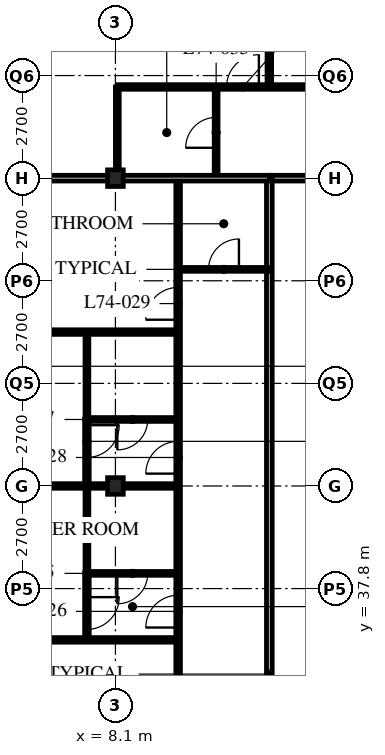
"""IFC4 building model, lengths in metres.
Left out: names, types, materials, properties, quantities, classifications, styles, units other than length and angle.
Written with IfcOpenShell. Run it as: python <this file> out.ifc"""

import sys

from ifc_helpers import new_model, si_unit, direction, frame, frame_2d, origin, origin_2d, place, context, subcontext, project, spatial, rectangle, i_section, extrude, element, fill, save


model = new_model("IFC4")
c1 = context("Model", 3, precision=1e-05, world=origin(), true_north=direction((0.0, 1.0)))
c2 = subcontext(c1, "Body", "Model", "MODEL_VIEW")
j1 = project(units=[si_unit("LENGTHUNIT", "METRE"), si_unit("PLANEANGLEUNIT", "RADIAN")], contexts=[c1])
p1 = place(None, origin())
s1 = spatial("IfcSite", under=j1, at=p1, CompositionType="ELEMENT")
p2 = place(p1, origin())
s2 = spatial("IfcBuilding", under=s1, at=p2, CompositionType="ELEMENT")
p3 = place(p2, frame((0.0, 0.0, 289.2)))
s3 = spatial("IfcBuildingStorey", under=s2, at=p3, CompositionType="ELEMENT", Elevation=289.2)
for number, where, z_axis, x_axis in (
    (1, (8.1, 40.5, 0.0), (0.0, 0.0, 1.0), (1.0, 0.0, 0.0)),
    (2, (8.1, 48.6, 0.0), (0.0, 0.0, 1.0), (1.0, 0.0, 0.0)),
):
    element("IfcColumn", number, at=place(p3, frame(where, z_axis=z_axis, x_axis=x_axis)), inside=s3, PredefinedType="COLUMN", context=c2, shape_type="SweptSolid", body=[
        extrude(i_section(OverallWidth=0.412, OverallDepth=0.437, WebThickness=0.036, FlangeThickness=0.058, FilletRadius=0.015, at=origin_2d()), origin(), (0.0, 0.0, 1.0), 3.9),
    ])
p4 = place(p3, frame((12.15, 48.6, 0.0), z_axis=(0.0, 0.0, 1.0), x_axis=(1.0, 0.0, 0.0)))
e3 = element("IfcWall", 3, at=p4, inside=s3, PredefinedType="PARTITIONING", context=c2, shape_type="SweptSolid", body=[
    extrude(rectangle(XDim=24.3, YDim=0.15, at=frame_2d((12.15, 0.0))), origin(), (0.0, 0.0, 1.0), 3.078),
])
p5 = place(p4, frame((4.95, 0.0, 0.0)))
e4 = element("IfcOpeningElement", 4, at=p5, cuts=e3, PredefinedType="OPENING", context=c2, shape_type="SweptSolid", body=[
    extrude(rectangle(XDim=1.0, YDim=2.1, at=frame_2d((0.5, 1.05))), frame((0.0, 0.085, 0.0), z_axis=(0.0, -1.0, 0.0), x_axis=(1.0, 0.0, 0.0)), (0.0, 0.0, 1.0), 0.17),
])
p6 = place(p4, frame((16.6, 0.0, 0.0)))
e5 = element("IfcOpeningElement", 5, at=p6, cuts=e3, PredefinedType="OPENING", context=c2, shape_type="SweptSolid", body=[
    extrude(rectangle(XDim=1.0, YDim=2.1, at=frame_2d((0.5, 1.05))), frame((0.0, 0.085, 0.0), z_axis=(0.0, -1.0, 0.0), x_axis=(1.0, 0.0, 0.0)), (0.0, 0.0, 1.0), 0.17),
])
p7 = place(p4, frame((1.525, 0.0, 0.0)))
e6 = element("IfcOpeningElement", 6, at=p7, cuts=e3, PredefinedType="OPENING", context=c2, shape_type="SweptSolid", body=[
    extrude(rectangle(XDim=1.0, YDim=2.1, at=frame_2d((0.5, 1.05))), frame((0.0, 0.085, 0.0), z_axis=(0.0, -1.0, 0.0), x_axis=(1.0, 0.0, 0.0)), (0.0, 0.0, 1.0), 0.17),
])
p8 = place(p3, frame((12.15, 22.5, 0.0), z_axis=(0.0, 0.0, 1.0), x_axis=(0.0, 1.0, 0.0)))
e7 = element("IfcWall", 7, at=p8, inside=s3, PredefinedType="PARTITIONING", context=c2, shape_type="SweptSolid", body=[
    extrude(rectangle(XDim=26.1, YDim=0.15, at=frame_2d((13.05, 0.0))), origin(), (0.0, 0.0, 1.0), 3.69),
])
p9 = place(p8, frame((0.4, 0.0, 0.0)))
e8 = element("IfcOpeningElement", 8, at=p9, cuts=e7, PredefinedType="OPENING", context=c2, shape_type="SweptSolid", body=[
    extrude(rectangle(XDim=1.0, YDim=2.1, at=frame_2d((0.5, 1.05))), frame((0.0, 0.085, 0.0), z_axis=(0.0, -1.0, 0.0), x_axis=(1.0, 0.0, 0.0)), (0.0, 0.0, 1.0), 0.17),
])
p10 = place(p3, frame((9.75, 22.5, 0.0), z_axis=(0.0, 0.0, 1.0), x_axis=(0.0, 1.0, 0.0)))
e9 = element("IfcWall", 9, at=p10, inside=s3, PredefinedType="PARTITIONING", context=c2, shape_type="SweptSolid", body=[
    extrude(rectangle(XDim=26.1, YDim=0.12, at=frame_2d((13.05, 0.0))), origin(), (0.0, 0.0, 1.0), 3.69),
])
p11 = place(p10, frame((0.975, 0.0, 0.0)))
e10 = element("IfcOpeningElement", 10, at=p11, cuts=e9, PredefinedType="OPENING", context=c2, shape_type="SweptSolid", body=[
    extrude(rectangle(XDim=0.85, YDim=2.1, at=frame_2d((0.425, 1.05))), frame((0.0, 0.07, 0.0), z_axis=(0.0, -1.0, 0.0), x_axis=(1.0, 0.0, 0.0)), (0.0, 0.0, 1.0), 0.14),
])
p12 = place(p10, frame((10.225, 0.0, 0.0)))
e11 = element("IfcOpeningElement", 11, at=p12, cuts=e9, PredefinedType="OPENING", context=c2, shape_type="SweptSolid", body=[
    extrude(rectangle(XDim=0.85, YDim=2.1, at=frame_2d((0.425, 1.05))), frame((0.0, 0.07, 0.0), z_axis=(0.0, -1.0, 0.0), x_axis=(1.0, 0.0, 0.0)), (0.0, 0.0, 1.0), 0.14),
])
p13 = place(p10, frame((14.275, 0.0, 0.0)))
e12 = element("IfcOpeningElement", 12, at=p13, cuts=e9, PredefinedType="OPENING", context=c2, shape_type="SweptSolid", body=[
    extrude(rectangle(XDim=0.85, YDim=2.1, at=frame_2d((0.425, 1.05))), frame((0.0, 0.07, 0.0), z_axis=(0.0, -1.0, 0.0), x_axis=(1.0, 0.0, 0.0)), (0.0, 0.0, 1.0), 0.14),
])
p14 = place(p10, frame((18.325, 0.0, 0.0)))
e13 = element("IfcOpeningElement", 13, at=p14, cuts=e9, PredefinedType="OPENING", context=c2, shape_type="SweptSolid", body=[
    extrude(rectangle(XDim=0.85, YDim=2.1, at=frame_2d((0.425, 1.05))), frame((0.0, 0.07, 0.0), z_axis=(0.0, -1.0, 0.0), x_axis=(1.0, 0.0, 0.0)), (0.0, 0.0, 1.0), 0.14),
])
p15 = place(p10, frame((22.375, 0.0, 0.0)))
e14 = element("IfcOpeningElement", 14, at=p15, cuts=e9, PredefinedType="OPENING", context=c2, shape_type="SweptSolid", body=[
    extrude(rectangle(XDim=0.85, YDim=2.1, at=frame_2d((0.425, 1.05))), frame((0.0, 0.07, 0.0), z_axis=(0.0, -1.0, 0.0), x_axis=(1.0, 0.0, 0.0)), (0.0, 0.0, 1.0), 0.14),
])
p16 = place(p3, frame((12.15, 46.2, 0.0), z_axis=(0.0, 0.0, 1.0), x_axis=(-1.0, 0.0, 0.0)))
e15 = element("IfcWall", 15, at=p16, inside=s3, PredefinedType="PARTITIONING", context=c2, shape_type="SweptSolid", body=[
    extrude(rectangle(XDim=2.4, YDim=0.1, at=frame_2d((1.2, 0.0))), origin(), (0.0, 0.0, 1.0), 3.69),
])
p17 = place(p16, frame((0.8, 0.0, 0.0)))
e16 = element("IfcOpeningElement", 16, at=p17, cuts=e15, PredefinedType="OPENING", context=c2, shape_type="SweptSolid", body=[
    extrude(rectangle(XDim=0.8, YDim=2.1, at=frame_2d((0.4, 1.05))), frame((0.0, 0.06, 0.0), z_axis=(0.0, -1.0, 0.0), x_axis=(1.0, 0.0, 0.0)), (0.0, 0.0, 1.0), 0.12),
])
p18 = place(p3, frame((9.75, 38.2, 0.0), z_axis=(0.0, 0.0, 1.0), x_axis=(-1.0, 0.0, 0.0)))
e17 = element("IfcWall", 17, at=p18, inside=s3, PredefinedType="PARTITIONING", context=c2, shape_type="SweptSolid", body=[
    extrude(rectangle(XDim=2.4, YDim=0.1, at=frame_2d((1.2, 0.0))), origin(), (0.0, 0.0, 1.0), 3.69),
])
p19 = place(p18, frame((0.8, 0.0, 0.0)))
e18 = element("IfcOpeningElement", 18, at=p19, cuts=e17, PredefinedType="OPENING", context=c2, shape_type="SweptSolid", body=[
    extrude(rectangle(XDim=0.8, YDim=2.1, at=frame_2d((0.4, 1.05))), frame((0.0, 0.06, 0.0), z_axis=(0.0, -1.0, 0.0), x_axis=(1.0, 0.0, 0.0)), (0.0, 0.0, 1.0), 0.12),
])
p20 = place(p3, frame((7.35, 38.2, 0.0), z_axis=(0.0, 0.0, 1.0), x_axis=(0.0, 1.0, 0.0)))
e19 = element("IfcWall", 19, at=p20, inside=s3, PredefinedType="PARTITIONING", context=c2, shape_type="SweptSolid", body=[
    extrude(rectangle(XDim=2.3, YDim=0.1, at=frame_2d((1.15, 0.0))), origin(), (0.0, 0.0, 1.0), 3.69),
])
p21 = place(p3, frame((9.75, 36.45, 0.0), z_axis=(0.0, 0.0, 1.0), x_axis=(-1.0, 0.0, 0.0)))
e20 = element("IfcWall", 20, at=p21, inside=s3, PredefinedType="PARTITIONING", context=c2, shape_type="SweptSolid", body=[
    extrude(rectangle(XDim=9.45, YDim=0.12, at=frame_2d((4.725, 0.0))), origin(), (0.0, 0.0, 1.0), 3.69),
])
p22 = place(p3, frame((9.75, 42.25, 0.0), z_axis=(0.0, 0.0, 1.0), x_axis=(-1.0, 0.0, 0.0)))
e21 = element("IfcWall", 21, at=p22, inside=s3, PredefinedType="PARTITIONING", context=c2, shape_type="SweptSolid", body=[
    extrude(rectangle(XDim=2.4, YDim=0.1, at=frame_2d((1.2, 0.0))), origin(), (0.0, 0.0, 1.0), 3.69),
])
p23 = place(p22, frame((0.8, 0.0, 0.0)))
e22 = element("IfcOpeningElement", 22, at=p23, cuts=e21, PredefinedType="OPENING", context=c2, shape_type="SweptSolid", body=[
    extrude(rectangle(XDim=0.8, YDim=2.1, at=frame_2d((0.4, 1.05))), frame((0.0, 0.06, 0.0), z_axis=(0.0, -1.0, 0.0), x_axis=(1.0, 0.0, 0.0)), (0.0, 0.0, 1.0), 0.12),
])
p24 = place(p3, frame((7.35, 42.25, 0.0), z_axis=(0.0, 0.0, 1.0), x_axis=(0.0, 1.0, 0.0)))
e23 = element("IfcWall", 23, at=p24, inside=s3, PredefinedType="PARTITIONING", context=c2, shape_type="SweptSolid", body=[
    extrude(rectangle(XDim=2.3, YDim=0.1, at=frame_2d((1.15, 0.0))), origin(), (0.0, 0.0, 1.0), 3.69),
])
p25 = place(p3, frame((9.75, 40.5, 0.0), z_axis=(0.0, 0.0, 1.0), x_axis=(-1.0, 0.0, 0.0)))
e24 = element("IfcWall", 24, at=p25, inside=s3, PredefinedType="PARTITIONING", context=c2, shape_type="SweptSolid", body=[
    extrude(rectangle(XDim=9.45, YDim=0.12, at=frame_2d((4.725, 0.0))), origin(), (0.0, 0.0, 1.0), 3.078),
])
p26 = place(p3, frame((9.75, 44.55, 0.0), z_axis=(0.0, 0.0, 1.0), x_axis=(-1.0, 0.0, 0.0)))
e25 = element("IfcWall", 25, at=p26, inside=s3, PredefinedType="PARTITIONING", context=c2, shape_type="SweptSolid", body=[
    extrude(rectangle(XDim=9.45, YDim=0.12, at=frame_2d((4.725, 0.0))), origin(), (0.0, 0.0, 1.0), 3.69),
])
p27 = place(p3, frame((10.75, 48.6, 0.0), z_axis=(0.0, 0.0, 1.0), x_axis=(0.0, 1.0, 0.0)))
e26 = element("IfcWall", 26, at=p27, inside=s3, PredefinedType="PARTITIONING", context=c2, shape_type="SweptSolid", body=[
    extrude(rectangle(XDim=2.4, YDim=0.1, at=frame_2d((1.2, 0.0))), origin(), (0.0, 0.0, 1.0), 3.69),
])
p28 = place(p27, frame((0.8, 0.0, 0.0)))
e27 = element("IfcOpeningElement", 27, at=p28, cuts=e26, PredefinedType="OPENING", context=c2, shape_type="SweptSolid", body=[
    extrude(rectangle(XDim=0.8, YDim=2.1, at=frame_2d((0.4, 1.05))), frame((0.0, 0.06, 0.0), z_axis=(0.0, -1.0, 0.0), x_axis=(1.0, 0.0, 0.0)), (0.0, 0.0, 1.0), 0.12),
])
p29 = place(p3, frame((8.15, 48.6, 0.0), z_axis=(0.0, 0.0, 1.0), x_axis=(0.0, 1.0, 0.0)))
e28 = element("IfcWall", 28, at=p29, inside=s3, PredefinedType="PARTITIONING", context=c2, shape_type="SweptSolid", body=[
    extrude(rectangle(XDim=2.4, YDim=0.1, at=frame_2d((1.2, 0.0))), origin(), (0.0, 0.0, 1.0), 3.078),
])
p30 = place(p3, frame((8.15, 51.0, 0.0), z_axis=(0.0, 0.0, 1.0), x_axis=(1.0, 0.0, 0.0)))
e29 = element("IfcWall", 29, at=p30, inside=s3, PredefinedType="PARTITIONING", context=c2, shape_type="SweptSolid", body=[
    extrude(rectangle(XDim=28.3, YDim=0.12, at=frame_2d((14.15, 0.0))), origin(), (0.0, 0.0, 1.0), 3.69),
])
p31 = place(p30, frame((9.025, 0.0, 0.0)))
e30 = element("IfcOpeningElement", 30, at=p31, cuts=e29, PredefinedType="OPENING", context=c2, shape_type="SweptSolid", body=[
    extrude(rectangle(XDim=0.85, YDim=2.1, at=frame_2d((0.425, 1.05))), frame((0.0, 0.07, 0.0), z_axis=(0.0, -1.0, 0.0), x_axis=(1.0, 0.0, 0.0)), (0.0, 0.0, 1.0), 0.14),
])
p32 = place(p30, frame((16.475, 0.0, 0.0)))
e31 = element("IfcOpeningElement", 31, at=p32, cuts=e29, PredefinedType="OPENING", context=c2, shape_type="SweptSolid", body=[
    extrude(rectangle(XDim=0.85, YDim=2.1, at=frame_2d((0.425, 1.05))), frame((0.0, 0.07, 0.0), z_axis=(0.0, -1.0, 0.0), x_axis=(1.0, 0.0, 0.0)), (0.0, 0.0, 1.0), 0.14),
])
p33 = place(p30, frame((21.175, 0.0, 0.0)))
e32 = element("IfcOpeningElement", 32, at=p33, cuts=e29, PredefinedType="OPENING", context=c2, shape_type="SweptSolid", body=[
    extrude(rectangle(XDim=0.85, YDim=2.1, at=frame_2d((0.425, 1.05))), frame((0.0, 0.07, 0.0), z_axis=(0.0, -1.0, 0.0), x_axis=(1.0, 0.0, 0.0)), (0.0, 0.0, 1.0), 0.14),
])
p34 = place(p30, frame((24.575, 0.0, 0.0)))
e33 = element("IfcOpeningElement", 33, at=p34, cuts=e29, PredefinedType="OPENING", context=c2, shape_type="SweptSolid", body=[
    extrude(rectangle(XDim=0.85, YDim=2.1, at=frame_2d((0.425, 1.05))), frame((0.0, 0.07, 0.0), z_axis=(0.0, -1.0, 0.0), x_axis=(1.0, 0.0, 0.0)), (0.0, 0.0, 1.0), 0.14),
])
p35 = place(p30, frame((6.725, 0.0, 0.0)))
e34 = element("IfcOpeningElement", 34, at=p35, cuts=e29, PredefinedType="OPENING", context=c2, shape_type="SweptSolid", body=[
    extrude(rectangle(XDim=0.85, YDim=2.1, at=frame_2d((0.425, 1.05))), frame((0.0, 0.07, 0.0), z_axis=(0.0, -1.0, 0.0), x_axis=(1.0, 0.0, 0.0)), (0.0, 0.0, 1.0), 0.14),
])
p36 = place(p30, frame((2.875, 0.0, 0.0)))
e35 = element("IfcOpeningElement", 35, at=p36, cuts=e29, PredefinedType="OPENING", context=c2, shape_type="SweptSolid", body=[
    extrude(rectangle(XDim=0.85, YDim=2.1, at=frame_2d((0.425, 1.05))), frame((0.0, 0.07, 0.0), z_axis=(0.0, -1.0, 0.0), x_axis=(1.0, 0.0, 0.0)), (0.0, 0.0, 1.0), 0.14),
])
p37 = place(p3, frame((12.15, 51.0, 0.0), z_axis=(0.0, 0.0, 1.0), x_axis=(0.0, 1.0, 0.0)))
e36 = element("IfcWall", 36, at=p37, inside=s3, PredefinedType="PARTITIONING", context=c2, shape_type="SweptSolid", body=[
    extrude(rectangle(XDim=13.5, YDim=0.12, at=frame_2d((6.75, 0.0))), origin(), (0.0, 0.0, 1.0), 3.69),
])
p38 = place(p3, frame((0.3, 48.6, 0.0), z_axis=(0.0, 0.0, 1.0), x_axis=(1.0, 0.0, 0.0)))
e37 = element("IfcWall", 37, at=p38, inside=s3, PredefinedType="PARTITIONING", context=c2, shape_type="SweptSolid", body=[
    extrude(rectangle(XDim=11.85, YDim=0.15, at=frame_2d((5.925, 0.0))), origin(), (0.0, 0.0, 1.0), 3.078),
])
p39 = place(p3, frame((7.35, 36.45, 0.0), z_axis=(0.0, 0.0, 1.0), x_axis=(0.0, 1.0, 0.0)))
e38 = element("IfcWall", 38, at=p39, inside=s3, PredefinedType="PARTITIONING", context=c2, shape_type="SweptSolid", body=[
    extrude(rectangle(XDim=1.76, YDim=0.12, at=frame_2d((0.88, 0.0))), origin(), (0.0, 0.0, 1.0), 3.69),
])
p40 = place(p39, frame((0.275, 0.0, 0.0)))
e39 = element("IfcOpeningElement", 39, at=p40, cuts=e38, PredefinedType="OPENING", context=c2, shape_type="SweptSolid", body=[
    extrude(rectangle(XDim=0.85, YDim=2.1, at=frame_2d((0.425, 1.05))), frame((0.0, 0.07, 0.0), z_axis=(0.0, -1.0, 0.0), x_axis=(1.0, 0.0, 0.0)), (0.0, 0.0, 1.0), 0.14),
])
p41 = place(p3, frame((7.35, 40.5, 0.0), z_axis=(0.0, 0.0, 1.0), x_axis=(0.0, 1.0, 0.0)))
e40 = element("IfcWall", 40, at=p41, inside=s3, PredefinedType="PARTITIONING", context=c2, shape_type="SweptSolid", body=[
    extrude(rectangle(XDim=1.76, YDim=0.12, at=frame_2d((0.88, 0.0))), origin(), (0.0, 0.0, 1.0), 3.69),
])
p42 = place(p41, frame((0.75, 0.0, 0.0)))
e41 = element("IfcOpeningElement", 41, at=p42, cuts=e40, PredefinedType="OPENING", context=c2, shape_type="SweptSolid", body=[
    extrude(rectangle(XDim=0.85, YDim=2.1, at=frame_2d((0.425, 1.05))), frame((0.0, 0.07, 0.0), z_axis=(0.0, -1.0, 0.0), x_axis=(1.0, 0.0, 0.0)), (0.0, 0.0, 1.0), 0.14),
])
p43 = place(p17, origin())
e42 = element("IfcDoor", 42, at=p43, inside=s3, OperationType="SINGLE_SWING_RIGHT", PredefinedType="DOOR", context=c2, shape_type="SweptSolid", body=[
    extrude(rectangle(XDim=0.8, YDim=2.1, at=frame_2d((0.4, 1.05))), frame((0.0, 0.025, 0.0), z_axis=(0.0, -1.0, 0.0), x_axis=(1.0, 0.0, 0.0)), (0.0, 0.0, 1.0), 0.05),
])
fill(e16, e42)
p44 = place(p19, origin())
e43 = element("IfcDoor", 43, at=p44, inside=s3, OperationType="SINGLE_SWING_RIGHT", PredefinedType="DOOR", context=c2, shape_type="SweptSolid", body=[
    extrude(rectangle(XDim=0.8, YDim=2.1, at=frame_2d((0.4, 1.05))), frame((0.0, 0.025, 0.0), z_axis=(0.0, -1.0, 0.0), x_axis=(1.0, 0.0, 0.0)), (0.0, 0.0, 1.0), 0.05),
])
fill(e18, e43)
p45 = place(p13, origin())
e44 = element("IfcDoor", 44, at=p45, inside=s3, OperationType="SINGLE_SWING_LEFT", PredefinedType="DOOR", context=c2, shape_type="SweptSolid", body=[
    extrude(rectangle(XDim=0.85, YDim=2.1, at=frame_2d((0.425, 1.05))), frame((0.0, 0.025, 0.0), z_axis=(0.0, -1.0, 0.0), x_axis=(1.0, 0.0, 0.0)), (0.0, 0.0, 1.0), 0.05),
])
fill(e12, e44)
p46 = place(p23, origin())
e45 = element("IfcDoor", 45, at=p46, inside=s3, OperationType="SINGLE_SWING_RIGHT", PredefinedType="DOOR", context=c2, shape_type="SweptSolid", body=[
    extrude(rectangle(XDim=0.8, YDim=2.1, at=frame_2d((0.4, 1.05))), frame((0.0, 0.025, 0.0), z_axis=(0.0, -1.0, 0.0), x_axis=(1.0, 0.0, 0.0)), (0.0, 0.0, 1.0), 0.05),
])
fill(e22, e45)
p47 = place(p14, origin())
e46 = element("IfcDoor", 46, at=p47, inside=s3, OperationType="SINGLE_SWING_LEFT", PredefinedType="DOOR", context=c2, shape_type="SweptSolid", body=[
    extrude(rectangle(XDim=0.85, YDim=2.1, at=frame_2d((0.425, 1.05))), frame((0.0, 0.025, 0.0), z_axis=(0.0, -1.0, 0.0), x_axis=(1.0, 0.0, 0.0)), (0.0, 0.0, 1.0), 0.05),
])
fill(e13, e46)
p48 = place(p15, origin())
e47 = element("IfcDoor", 47, at=p48, inside=s3, OperationType="SINGLE_SWING_LEFT", PredefinedType="DOOR", context=c2, shape_type="SweptSolid", body=[
    extrude(rectangle(XDim=0.85, YDim=2.1, at=frame_2d((0.425, 1.05))), frame((0.0, 0.025, 0.0), z_axis=(0.0, -1.0, 0.0), x_axis=(1.0, 0.0, 0.0)), (0.0, 0.0, 1.0), 0.05),
])
fill(e14, e47)
p49 = place(p28, origin())
e48 = element("IfcDoor", 48, at=p49, inside=s3, OperationType="SINGLE_SWING_LEFT", PredefinedType="DOOR", context=c2, shape_type="SweptSolid", body=[
    extrude(rectangle(XDim=0.8, YDim=2.1, at=frame_2d((0.4, 1.05))), frame((0.0, 0.025, 0.0), z_axis=(0.0, -1.0, 0.0), x_axis=(1.0, 0.0, 0.0)), (0.0, 0.0, 1.0), 0.05),
])
fill(e27, e48)
p50 = place(p36, origin())
e49 = element("IfcDoor", 49, at=p50, inside=s3, OperationType="SINGLE_SWING_RIGHT", PredefinedType="DOOR", context=c2, shape_type="SweptSolid", body=[
    extrude(rectangle(XDim=0.85, YDim=2.1, at=frame_2d((0.425, 1.05))), frame((0.0, 0.025, 0.0), z_axis=(0.0, -1.0, 0.0), x_axis=(1.0, 0.0, 0.0)), (0.0, 0.0, 1.0), 0.05),
])
fill(e35, e49)
p51 = place(p40, origin())
e50 = element("IfcDoor", 50, at=p51, inside=s3, OperationType="SINGLE_SWING_LEFT", PredefinedType="DOOR", context=c2, shape_type="SweptSolid", body=[
    extrude(rectangle(XDim=0.85, YDim=2.1, at=frame_2d((0.425, 1.05))), frame((0.0, 0.025, 0.0), z_axis=(0.0, -1.0, 0.0), x_axis=(1.0, 0.0, 0.0)), (0.0, 0.0, 1.0), 0.05),
])
fill(e39, e50)
p52 = place(p42, origin())
e51 = element("IfcDoor", 51, at=p52, inside=s3, OperationType="SINGLE_SWING_LEFT", PredefinedType="DOOR", context=c2, shape_type="SweptSolid", body=[
    extrude(rectangle(XDim=0.85, YDim=2.1, at=frame_2d((0.425, 1.05))), frame((0.0, 0.025, 0.0), z_axis=(0.0, -1.0, 0.0), x_axis=(1.0, 0.0, 0.0)), (0.0, 0.0, 1.0), 0.05),
])
fill(e41, e51)
save(model, sys.argv[1])
